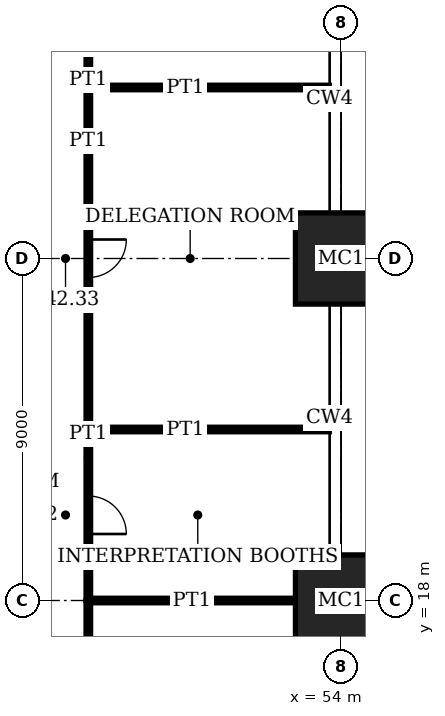
"""IFC4 building model, lengths in metres.
Left out: names, types, materials, properties, quantities, classifications, styles, units other than length and angle.
Written with IfcOpenShell. Run it as: python <this file> out.ifc"""

import sys

from ifc_helpers import new_model, si_unit, direction, frame, frame_2d, origin, origin_2d, place, context, subcontext, project, spatial, rectangle, extrude, element, fill, save


model = new_model("IFC4")
c1 = context("Model", 3, precision=1e-05, world=origin(), true_north=direction((0.0, 1.0)))
c2 = subcontext(c1, "Body", "Model", "MODEL_VIEW")
j1 = project(units=[si_unit("LENGTHUNIT", "METRE"), si_unit("PLANEANGLEUNIT", "RADIAN")], contexts=[c1])
p1 = place(None, origin())
s1 = spatial("IfcSite", under=j1, at=p1, CompositionType="ELEMENT")
p2 = place(p1, origin())
s2 = spatial("IfcBuilding", under=s1, at=p2, CompositionType="ELEMENT")
p3 = place(p2, frame((0.0, 0.0, 174.2)))
s3 = spatial("IfcBuildingStorey", under=s2, at=p3, CompositionType="ELEMENT", Elevation=174.2)
for number, where, z_axis, x_axis in (
    (1, (54.0, 18.0, 0.0), (0.0, 0.0, 1.0), (1.0, 0.0, 0.0)),
    (2, (54.0, 27.0, 0.0), (0.0, 0.0, 1.0), (1.0, 0.0, 0.0)),
):
    element("IfcColumn", number, at=place(p3, frame(where, z_axis=z_axis, x_axis=x_axis)), inside=s3, PredefinedType="COLUMN", context=c2, shape_type="SweptSolid", body=[
        extrude(rectangle(XDim=2.4, YDim=2.4, at=origin_2d()), origin(), (0.0, 0.0, 1.0), 4.0),
    ])
p4 = place(p3, frame((47.35, 18.0, 0.0), z_axis=(0.0, 0.0, 1.0), x_axis=(1.0, 0.0, 0.0)))
e3 = element("IfcWall", 3, at=p4, inside=s3, PredefinedType="PARTITIONING", context=c2, shape_type="SweptSolid", body=[
    extrude(rectangle(XDim=5.45, YDim=0.12, at=frame_2d((2.725, 0.0))), origin(), (0.0, 0.0, 1.0), 3.05),
])
for number, where, z_axis, x_axis in (
    (4, (47.35, 22.5, 0.0), (0.0, 0.0, 1.0), (1.0, 0.0, 0.0)),
    (5, (47.35, 31.5, 0.0), (0.0, 0.0, 1.0), (1.0, 0.0, 0.0)),
):
    element("IfcWall", number, at=place(p3, frame(where, z_axis=z_axis, x_axis=x_axis)), inside=s3, PredefinedType="PARTITIONING", context=c2, shape_type="SweptSolid", body=[
        extrude(rectangle(XDim=6.34, YDim=0.12, at=frame_2d((3.17, 0.0))), origin(), (0.0, 0.0, 1.0), 3.1),
    ])
p5 = place(p3, frame((47.35, 9.0, 0.0), z_axis=(0.0, 0.0, 1.0), x_axis=(0.0, 1.0, 0.0)))
e6 = element("IfcWall", 6, at=p5, inside=s3, PredefinedType="PARTITIONING", context=c2, shape_type="SweptSolid", body=[
    extrude(rectangle(XDim=9.0, YDim=0.12, at=frame_2d((4.5, 0.0))), origin(), (0.0, 0.0, 1.0), 3.75),
])
p6 = place(p5, frame((4.0, 0.0, 0.0)))
e7 = element("IfcOpeningElement", 7, at=p6, cuts=e6, PredefinedType="OPENING", context=c2, shape_type="SweptSolid", body=[
    extrude(rectangle(XDim=1.0, YDim=2.4, at=frame_2d((0.5, 1.2))), frame((0.0, 0.07, 0.0), z_axis=(0.0, -1.0, 0.0), x_axis=(1.0, 0.0, 0.0)), (0.0, 0.0, 1.0), 0.14),
])
p7 = place(p3, frame((47.35, 18.0, 0.0), z_axis=(0.0, 0.0, 1.0), x_axis=(0.0, 1.0, 0.0)))
e8 = element("IfcWall", 8, at=p7, inside=s3, PredefinedType="PARTITIONING", context=c2, shape_type="SweptSolid", body=[
    extrude(rectangle(XDim=4.5, YDim=0.12, at=frame_2d((2.25, 0.0))), origin(), (0.0, 0.0, 1.0), 3.75),
])
p8 = place(p7, frame((1.75, 0.0, 0.0)))
e9 = element("IfcOpeningElement", 9, at=p8, cuts=e8, PredefinedType="OPENING", context=c2, shape_type="SweptSolid", body=[
    extrude(rectangle(XDim=1.0, YDim=2.4, at=frame_2d((0.5, 1.2))), frame((0.0, 0.07, 0.0), z_axis=(0.0, -1.0, 0.0), x_axis=(1.0, 0.0, 0.0)), (0.0, 0.0, 1.0), 0.14),
])
p9 = place(p3, frame((47.35, 22.5, 0.0), z_axis=(0.0, 0.0, 1.0), x_axis=(0.0, 1.0, 0.0)))
e10 = element("IfcWall", 10, at=p9, inside=s3, PredefinedType="PARTITIONING", context=c2, shape_type="SweptSolid", body=[
    extrude(rectangle(XDim=9.0, YDim=0.12, at=frame_2d((4.5, 0.0))), origin(), (0.0, 0.0, 1.0), 3.75),
])
p10 = place(p9, frame((4.0, 0.0, 0.0)))
e11 = element("IfcOpeningElement", 11, at=p10, cuts=e10, PredefinedType="OPENING", context=c2, shape_type="SweptSolid", body=[
    extrude(rectangle(XDim=1.0, YDim=2.4, at=frame_2d((0.5, 1.2))), frame((0.0, 0.07, 0.0), z_axis=(0.0, -1.0, 0.0), x_axis=(1.0, 0.0, 0.0)), (0.0, 0.0, 1.0), 0.14),
])
p11 = place(p3, frame((47.35, 31.5, 0.0), z_axis=(0.0, 0.0, 1.0), x_axis=(0.0, 1.0, 0.0)))
e12 = element("IfcWall", 12, at=p11, inside=s3, PredefinedType="PARTITIONING", context=c2, shape_type="SweptSolid", body=[
    extrude(rectangle(XDim=4.5, YDim=0.12, at=frame_2d((2.25, 0.0))), origin(), (0.0, 0.0, 1.0), 3.75),
])
p12 = place(p11, frame((1.75, 0.0, 0.0)))
e13 = element("IfcOpeningElement", 13, at=p12, cuts=e12, PredefinedType="OPENING", context=c2, shape_type="SweptSolid", body=[
    extrude(rectangle(XDim=1.0, YDim=2.4, at=frame_2d((0.5, 1.2))), frame((0.0, 0.07, 0.0), z_axis=(0.0, -1.0, 0.0), x_axis=(1.0, 0.0, 0.0)), (0.0, 0.0, 1.0), 0.14),
])
p13 = place(p8, origin())
e14 = element("IfcDoor", 14, at=p13, inside=s3, OperationType="SINGLE_SWING_LEFT", PredefinedType="DOOR", context=c2, shape_type="SweptSolid", body=[
    extrude(rectangle(XDim=1.0, YDim=2.4, at=frame_2d((0.5, 1.2))), frame((0.0, 0.025, 0.0), z_axis=(0.0, -1.0, 0.0), x_axis=(1.0, 0.0, 0.0)), (0.0, 0.0, 1.0), 0.05),
])
fill(e9, e14)
p14 = place(p10, origin())
e15 = element("IfcDoor", 15, at=p14, inside=s3, OperationType="SINGLE_SWING_RIGHT", PredefinedType="DOOR", context=c2, shape_type="SweptSolid", body=[
    extrude(rectangle(XDim=1.0, YDim=2.4, at=frame_2d((0.5, 1.2))), frame((0.0, 0.025, 0.0), z_axis=(0.0, -1.0, 0.0), x_axis=(1.0, 0.0, 0.0)), (0.0, 0.0, 1.0), 0.05),
])
fill(e11, e15)
save(model, sys.argv[1])
